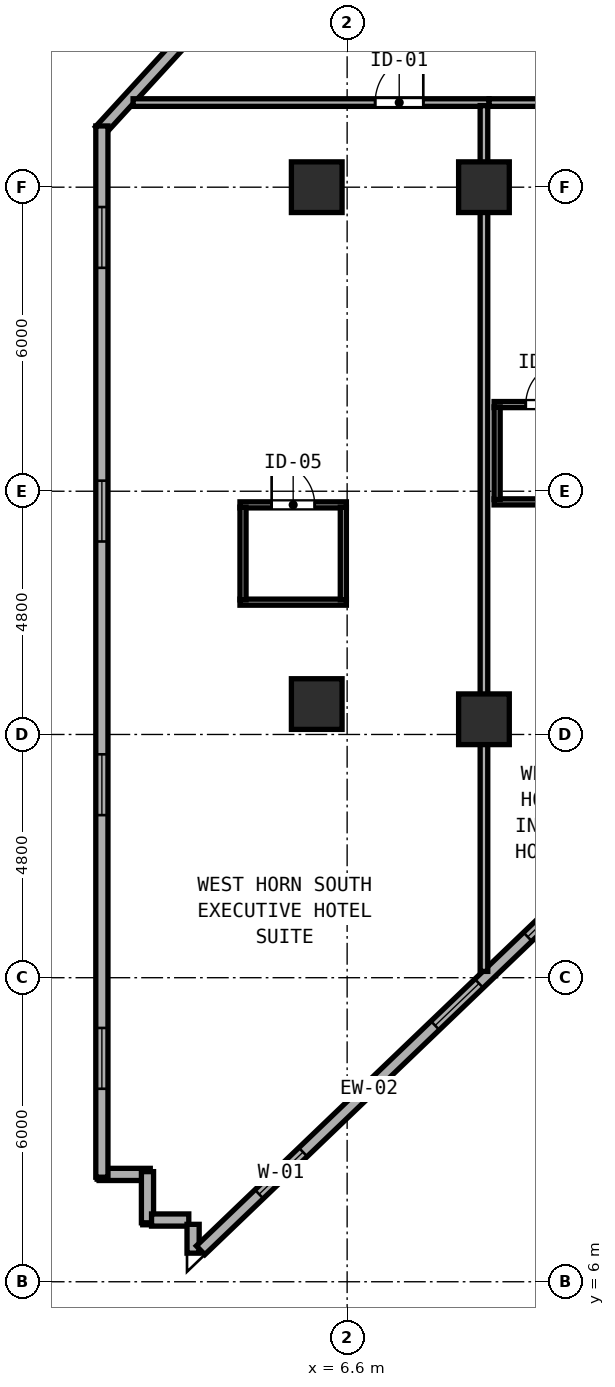
"""IFC4 building model, lengths in metres.
Left out: names, types, materials, properties, quantities, classifications, styles, units other than length and angle.
Written with IfcOpenShell. Run it as: python <this file> out.ifc"""

import sys

from ifc_helpers import new_model, si_unit, direction, frame, frame_2d, origin, origin_2d, place, context, subcontext, project, spatial, rectangle, hollow_rectangle, extrude, element, fill, save


model = new_model("IFC4")
c1 = context("Model", 3, precision=1e-05, world=origin(), true_north=direction((0.0, 1.0)))
c2 = subcontext(c1, "Body", "Model", "MODEL_VIEW")
j1 = project(units=[si_unit("LENGTHUNIT", "METRE"), si_unit("PLANEANGLEUNIT", "RADIAN")], contexts=[c1])
p1 = place(None, origin())
s1 = spatial("IfcSite", under=j1, at=p1, CompositionType="ELEMENT")
p2 = place(p1, origin())
s2 = spatial("IfcBuilding", under=s1, at=p2, CompositionType="ELEMENT")
p3 = place(p2, frame((0.0, 0.0, 55.2)))
s3 = spatial("IfcBuildingStorey", under=s2, at=p3, CompositionType="ELEMENT", Elevation=55.2)
for number, where, z_axis, x_axis in (
    (1, (6.0, 17.4, 0.0), (0.0, 0.0, 1.0), (1.0, 0.0, 0.0)),
    (2, (6.0, 27.6, 0.0), (0.0, 0.0, 1.0), (1.0, 0.0, 0.0)),
    (3, (9.3, 17.1, 0.0), (0.0, 0.0, 1.0), (1.0, 0.0, 0.0)),
    (4, (9.3, 27.6, 0.0), (0.0, 0.0, 1.0), (1.0, 0.0, 0.0)),
):
    element("IfcColumn", number, at=place(p3, frame(where, z_axis=z_axis, x_axis=x_axis)), inside=s3, PredefinedType="COLUMN", context=c2, shape_type="SweptSolid", body=[
        extrude(hollow_rectangle(XDim=1.0, YDim=1.0, WallThickness=0.038, at=origin_2d()), origin(), (0.0, 0.0, 1.0), 3.8),
    ])
for number, where, z_axis, x_axis in (
    (5, (1.705, 8.118, 0.0), (0.0, 0.0, 1.0), (1.0, 0.0, 0.0)),
    (6, (2.66, 8.173, 0.0), (0.0, 0.0, 1.0), (0.0, -1.0, 0.0)),
):
    element("IfcWall", number, at=place(p3, frame(where, z_axis=z_axis, x_axis=x_axis)), inside=s3, PredefinedType="SOLIDWALL", context=c2, shape_type="SweptSolid", body=[
        extrude(rectangle(XDim=1.01, YDim=0.24, at=frame_2d((0.505, 0.0))), origin(), (0.0, 0.0, 1.0), 3.6),
    ])
p4 = place(p3, frame((2.74, 7.218, 0.0), z_axis=(0.0, 0.0, 1.0), x_axis=(1.0, 0.0, 0.0)))
e7 = element("IfcWall", 7, at=p4, inside=s3, PredefinedType="SOLIDWALL", context=c2, shape_type="SweptSolid", body=[
    extrude(rectangle(XDim=0.735, YDim=0.24, at=frame_2d((0.368, 0.0))), origin(), (0.0, 0.0, 1.0), 3.6),
])
p5 = place(p3, frame((3.56, 7.133, 0.0), z_axis=(0.0, 0.0, 1.0), x_axis=(0.0, -1.0, 0.0)))
e8 = element("IfcWall", 8, at=p5, inside=s3, PredefinedType="SOLIDWALL", context=c2, shape_type="SweptSolid", body=[
    extrude(rectangle(XDim=0.569, YDim=0.24, at=frame_2d((0.284, 0.0))), origin(), (0.0, 0.0, 1.0), 3.6),
])
p6 = place(p3, frame((3.708, 6.621, 0.0), z_axis=(0.0, 0.0, 1.0), x_axis=(0.722047630521, 0.691843348786, 0.0)))
e9 = element("IfcWall", 9, at=p6, inside=s3, PredefinedType="SOLIDWALL", context=c2, shape_type="SweptSolid", body=[
    extrude(rectangle(XDim=11.373, YDim=0.24, at=frame_2d((5.687, 0.0))), origin(), (0.0, 0.0, 1.0), 3.6),
])
p7 = place(p6, frame((1.6, 0.0, 0.85)))
e10 = element("IfcOpeningElement", 10, at=p7, cuts=e9, PredefinedType="OPENING", context=c2, shape_type="SweptSolid", body=[
    extrude(rectangle(XDim=1.2, YDim=1.85, at=frame_2d((0.6, 0.925))), frame((0.0, 0.13, 0.0), z_axis=(0.0, -1.0, 0.0), x_axis=(1.0, 0.0, 0.0)), (0.0, 0.0, 1.0), 0.26),
])
p8 = place(p6, frame((6.41, 0.0, 0.85)))
e11 = element("IfcOpeningElement", 11, at=p8, cuts=e9, PredefinedType="OPENING", context=c2, shape_type="SweptSolid", body=[
    extrude(rectangle(XDim=1.2, YDim=1.85, at=frame_2d((0.6, 0.925))), frame((0.0, 0.13, 0.0), z_axis=(0.0, -1.0, 0.0), x_axis=(1.0, 0.0, 0.0)), (0.0, 0.0, 1.0), 0.26),
])
p9 = place(p6, frame((8.94, 0.0, 0.85)))
e12 = element("IfcOpeningElement", 12, at=p9, cuts=e9, PredefinedType="OPENING", context=c2, shape_type="SweptSolid", body=[
    extrude(rectangle(XDim=1.2, YDim=1.85, at=frame_2d((0.6, 0.925))), frame((0.0, 0.13, 0.0), z_axis=(0.0, -1.0, 0.0), x_axis=(1.0, 0.0, 0.0)), (0.0, 0.0, 1.0), 0.26),
])
p10 = place(p3, frame((3.943, 31.135, 0.0), z_axis=(0.0, 0.0, 1.0), x_axis=(-0.675751546976, -0.737129464042, 0.0)))
e13 = element("IfcWall", 13, at=p10, inside=s3, PredefinedType="SOLIDWALL", context=c2, shape_type="SweptSolid", body=[
    extrude(rectangle(XDim=3.286, YDim=0.24, at=frame_2d((1.643, 0.0))), origin(), (0.0, 0.0, 1.0), 3.6),
])
p11 = place(p3, frame((1.76, 28.808, 0.0), z_axis=(0.0, 0.0, 1.0), x_axis=(0.0, -1.0, 0.0)))
e14 = element("IfcWall", 14, at=p11, inside=s3, PredefinedType="SOLIDWALL", context=c2, shape_type="SweptSolid", body=[
    extrude(rectangle(XDim=20.745, YDim=0.24, at=frame_2d((10.373, 0.0))), origin(), (0.0, 0.0, 1.0), 3.6),
])
p12 = place(p11, frame((1.6, 0.0, 0.85)))
e15 = element("IfcOpeningElement", 15, at=p12, cuts=e14, PredefinedType="OPENING", context=c2, shape_type="SweptSolid", body=[
    extrude(rectangle(XDim=1.2, YDim=1.85, at=frame_2d((0.6, 0.925))), frame((0.0, 0.13, 0.0), z_axis=(0.0, -1.0, 0.0), x_axis=(1.0, 0.0, 0.0)), (0.0, 0.0, 1.0), 0.26),
])
p13 = place(p11, frame((7.0, 0.0, 0.85)))
e16 = element("IfcOpeningElement", 16, at=p13, cuts=e14, PredefinedType="OPENING", context=c2, shape_type="SweptSolid", body=[
    extrude(rectangle(XDim=1.2, YDim=1.85, at=frame_2d((0.6, 0.925))), frame((0.0, 0.13, 0.0), z_axis=(0.0, -1.0, 0.0), x_axis=(1.0, 0.0, 0.0)), (0.0, 0.0, 1.0), 0.26),
])
p14 = place(p11, frame((12.4, 0.0, 0.85)))
e17 = element("IfcOpeningElement", 17, at=p14, cuts=e14, PredefinedType="OPENING", context=c2, shape_type="SweptSolid", body=[
    extrude(rectangle(XDim=1.2, YDim=1.85, at=frame_2d((0.6, 0.925))), frame((0.0, 0.13, 0.0), z_axis=(0.0, -1.0, 0.0), x_axis=(1.0, 0.0, 0.0)), (0.0, 0.0, 1.0), 0.26),
])
p15 = place(p11, frame((17.8, 0.0, 0.85)))
e18 = element("IfcOpeningElement", 18, at=p15, cuts=e14, PredefinedType="OPENING", context=c2, shape_type="SweptSolid", body=[
    extrude(rectangle(XDim=1.2, YDim=1.85, at=frame_2d((0.6, 0.925))), frame((0.0, 0.13, 0.0), z_axis=(0.0, -1.0, 0.0), x_axis=(1.0, 0.0, 0.0)), (0.0, 0.0, 1.0), 0.26),
])
p16 = place(p3, frame((2.376, 29.27, 0.0), z_axis=(0.0, 0.0, 1.0), x_axis=(1.0, 0.0, 0.0)))
e19 = element("IfcWall", 19, at=p16, inside=s3, PredefinedType="PARTITIONING", context=c2, shape_type="SweptSolid", body=[
    extrude(rectangle(XDim=7.024, YDim=0.15, at=frame_2d((3.512, 0.0))), origin(), (0.0, 0.0, 1.0), 3.6),
])
p17 = place(p16, frame((5.727, 0.0, 0.0), z_axis=(0.0, 0.0, 1.0), x_axis=(-1.0, 0.0, 0.0)))
e20 = element("IfcOpeningElement", 20, at=p17, cuts=e19, PredefinedType="OPENING", context=c2, shape_type="SweptSolid", body=[
    extrude(rectangle(XDim=0.95, YDim=2.18, at=frame_2d((0.475, 1.09))), frame((0.0, 0.085, 0.0), z_axis=(0.0, -1.0, 0.0), x_axis=(1.0, 0.0, 0.0)), (0.0, 0.0, 1.0), 0.17),
])
p18 = place(p3, frame((9.3, 12.125, 0.0), z_axis=(0.0, 0.0, 1.0), x_axis=(0.0, 1.0, 0.0)))
e21 = element("IfcWall", 21, at=p18, inside=s3, PredefinedType="PARTITIONING", context=c2, shape_type="SweptSolid", body=[
    extrude(rectangle(XDim=17.085, YDim=0.15, at=frame_2d((8.543, 0.0))), origin(), (0.0, 0.0, 1.0), 3.6),
])
p19 = place(p3, frame((4.485, 21.331, 0.0), z_axis=(0.0, 0.0, 1.0), x_axis=(1.0, 0.0, 0.0)))
e22 = element("IfcWall", 22, at=p19, inside=s3, PredefinedType="PARTITIONING", context=c2, shape_type="SweptSolid", body=[
    extrude(rectangle(XDim=2.1, YDim=0.12, at=frame_2d((1.05, 0.0))), origin(), (0.0, 0.0, 1.0), 3.6),
])
p20 = place(p19, frame((1.475, 0.0, 0.0), z_axis=(0.0, 0.0, 1.0), x_axis=(-1.0, 0.0, 0.0)))
e23 = element("IfcOpeningElement", 23, at=p20, cuts=e22, PredefinedType="OPENING", context=c2, shape_type="SweptSolid", body=[
    extrude(rectangle(XDim=0.85, YDim=2.1, at=frame_2d((0.425, 1.05))), frame((0.0, 0.07, 0.0), z_axis=(0.0, -1.0, 0.0), x_axis=(1.0, 0.0, 0.0)), (0.0, 0.0, 1.0), 0.14),
])
p21 = place(p3, frame((4.485, 19.411, 0.0), z_axis=(0.0, 0.0, 1.0), x_axis=(1.0, 0.0, 0.0)))
e24 = element("IfcWall", 24, at=p21, inside=s3, PredefinedType="PARTITIONING", context=c2, shape_type="SweptSolid", body=[
    extrude(rectangle(XDim=2.1, YDim=0.12, at=frame_2d((1.05, 0.0))), origin(), (0.0, 0.0, 1.0), 3.6),
])
for number, where, z_axis, x_axis in (
    (25, (4.545, 19.456, 0.0), (0.0, 0.0, 1.0), (0.0, 1.0, 0.0)),
    (26, (6.525, 19.456, 0.0), (0.0, 0.0, 1.0), (0.0, 1.0, 0.0)),
):
    element("IfcWall", number, at=place(p3, frame(where, z_axis=z_axis, x_axis=x_axis)), inside=s3, PredefinedType="PARTITIONING", context=c2, shape_type="SweptSolid", body=[
        extrude(rectangle(XDim=1.83, YDim=0.12, at=frame_2d((0.915, 0.0))), origin(), (0.0, 0.0, 1.0), 3.6),
    ])
p22 = place(p3, frame((9.402, 29.27, 0.0), z_axis=(0.0, 0.0, 1.0), x_axis=(1.0, 0.0, 0.0)))
e27 = element("IfcWall", 27, at=p22, inside=s3, PredefinedType="PARTITIONING", context=c2, shape_type="SweptSolid", body=[
    extrude(rectangle(XDim=2.296, YDim=0.15, at=frame_2d((1.148, 0.0))), origin(), (0.0, 0.0, 1.0), 3.6),
])
p23 = place(p22, frame((1.934, 0.0, 0.0), z_axis=(0.0, 0.0, 1.0), x_axis=(-1.0, 0.0, 0.0)))
e28 = element("IfcOpeningElement", 28, at=p23, cuts=e27, PredefinedType="OPENING", context=c2, shape_type="SweptSolid", body=[
    extrude(rectangle(XDim=0.95, YDim=2.15, at=frame_2d((0.475, 1.075))), frame((0.0, 0.085, 0.0), z_axis=(0.0, -1.0, 0.0), x_axis=(1.0, 0.0, 0.0)), (0.0, 0.0, 1.0), 0.17),
])
p24 = place(p3, frame((9.5, 23.31, 0.0), z_axis=(0.0, 0.0, 1.0), x_axis=(1.0, 0.0, 0.0)))
e29 = element("IfcWall", 29, at=p24, inside=s3, PredefinedType="PARTITIONING", context=c2, shape_type="SweptSolid", body=[
    extrude(rectangle(XDim=2.1, YDim=0.12, at=frame_2d((1.05, 0.0))), origin(), (0.0, 0.0, 1.0), 3.6),
])
p25 = place(p24, frame((1.475, 0.0, 0.0), z_axis=(0.0, 0.0, 1.0), x_axis=(-1.0, 0.0, 0.0)))
e30 = element("IfcOpeningElement", 30, at=p25, cuts=e29, PredefinedType="OPENING", context=c2, shape_type="SweptSolid", body=[
    extrude(rectangle(XDim=0.85, YDim=2.1, at=frame_2d((0.425, 1.05))), frame((0.0, 0.07, 0.0), z_axis=(0.0, -1.0, 0.0), x_axis=(1.0, 0.0, 0.0)), (0.0, 0.0, 1.0), 0.14),
])
p26 = place(p3, frame((9.5, 21.39, 0.0), z_axis=(0.0, 0.0, 1.0), x_axis=(1.0, 0.0, 0.0)))
e31 = element("IfcWall", 31, at=p26, inside=s3, PredefinedType="PARTITIONING", context=c2, shape_type="SweptSolid", body=[
    extrude(rectangle(XDim=2.1, YDim=0.12, at=frame_2d((1.05, 0.0))), origin(), (0.0, 0.0, 1.0), 3.6),
])
p27 = place(p3, frame((9.56, 21.435, 0.0), z_axis=(0.0, 0.0, 1.0), x_axis=(0.0, 1.0, 0.0)))
e32 = element("IfcWall", 32, at=p27, inside=s3, PredefinedType="PARTITIONING", context=c2, shape_type="SweptSolid", body=[
    extrude(rectangle(XDim=1.83, YDim=0.12, at=frame_2d((0.915, 0.0))), origin(), (0.0, 0.0, 1.0), 3.6),
])
p28 = place(p7, origin())
e33 = element("IfcWindow", 33, at=p28, inside=s3, PartitioningType="SINGLE_PANEL", PredefinedType="WINDOW", context=c2, shape_type="SweptSolid", body=[
    extrude(rectangle(XDim=1.2, YDim=1.85, at=frame_2d((0.6, 0.925))), frame((0.0, 0.03, 0.0), z_axis=(0.0, -1.0, 0.0), x_axis=(1.0, 0.0, 0.0)), (0.0, 0.0, 1.0), 0.06),
])
fill(e10, e33)
p29 = place(p8, origin())
e34 = element("IfcWindow", 34, at=p29, inside=s3, PartitioningType="SINGLE_PANEL", PredefinedType="WINDOW", context=c2, shape_type="SweptSolid", body=[
    extrude(rectangle(XDim=1.2, YDim=1.85, at=frame_2d((0.6, 0.925))), frame((0.0, 0.03, 0.0), z_axis=(0.0, -1.0, 0.0), x_axis=(1.0, 0.0, 0.0)), (0.0, 0.0, 1.0), 0.06),
])
fill(e11, e34)
p30 = place(p12, origin())
e35 = element("IfcWindow", 35, at=p30, inside=s3, PartitioningType="SINGLE_PANEL", PredefinedType="WINDOW", context=c2, shape_type="SweptSolid", body=[
    extrude(rectangle(XDim=1.2, YDim=1.85, at=frame_2d((0.6, 0.925))), frame((0.0, 0.03, 0.0), z_axis=(0.0, -1.0, 0.0), x_axis=(1.0, 0.0, 0.0)), (0.0, 0.0, 1.0), 0.06),
])
fill(e15, e35)
p31 = place(p13, origin())
e36 = element("IfcWindow", 36, at=p31, inside=s3, PartitioningType="SINGLE_PANEL", PredefinedType="WINDOW", context=c2, shape_type="SweptSolid", body=[
    extrude(rectangle(XDim=1.2, YDim=1.85, at=frame_2d((0.6, 0.925))), frame((0.0, 0.03, 0.0), z_axis=(0.0, -1.0, 0.0), x_axis=(1.0, 0.0, 0.0)), (0.0, 0.0, 1.0), 0.06),
])
fill(e16, e36)
p32 = place(p14, origin())
e37 = element("IfcWindow", 37, at=p32, inside=s3, PartitioningType="SINGLE_PANEL", PredefinedType="WINDOW", context=c2, shape_type="SweptSolid", body=[
    extrude(rectangle(XDim=1.2, YDim=1.85, at=frame_2d((0.6, 0.925))), frame((0.0, 0.03, 0.0), z_axis=(0.0, -1.0, 0.0), x_axis=(1.0, 0.0, 0.0)), (0.0, 0.0, 1.0), 0.06),
])
fill(e17, e37)
p33 = place(p15, origin())
e38 = element("IfcWindow", 38, at=p33, inside=s3, PartitioningType="SINGLE_PANEL", PredefinedType="WINDOW", context=c2, shape_type="SweptSolid", body=[
    extrude(rectangle(XDim=1.2, YDim=1.85, at=frame_2d((0.6, 0.925))), frame((0.0, 0.03, 0.0), z_axis=(0.0, -1.0, 0.0), x_axis=(1.0, 0.0, 0.0)), (0.0, 0.0, 1.0), 0.06),
])
fill(e18, e38)
p34 = place(p17, origin())
e39 = element("IfcDoor", 39, at=p34, inside=s3, OperationType="SINGLE_SWING_LEFT", PredefinedType="DOOR", context=c2, shape_type="SweptSolid", body=[
    extrude(rectangle(XDim=0.95, YDim=2.18, at=frame_2d((0.475, 1.09))), frame((0.0, 0.025, 0.0), z_axis=(0.0, -1.0, 0.0), x_axis=(1.0, 0.0, 0.0)), (0.0, 0.0, 1.0), 0.05),
])
fill(e20, e39)
p35 = place(p20, origin())
e40 = element("IfcDoor", 40, at=p35, inside=s3, OperationType="SINGLE_SWING_RIGHT", PredefinedType="DOOR", context=c2, shape_type="SweptSolid", body=[
    extrude(rectangle(XDim=0.85, YDim=2.1, at=frame_2d((0.425, 1.05))), frame((0.0, 0.025, 0.0), z_axis=(0.0, -1.0, 0.0), x_axis=(1.0, 0.0, 0.0)), (0.0, 0.0, 1.0), 0.05),
])
fill(e23, e40)
p36 = place(p25, origin())
e41 = element("IfcDoor", 41, at=p36, inside=s3, OperationType="SINGLE_SWING_LEFT", PredefinedType="DOOR", context=c2, shape_type="SweptSolid", body=[
    extrude(rectangle(XDim=0.85, YDim=2.1, at=frame_2d((0.425, 1.05))), frame((0.0, 0.025, 0.0), z_axis=(0.0, -1.0, 0.0), x_axis=(1.0, 0.0, 0.0)), (0.0, 0.0, 1.0), 0.05),
])
fill(e30, e41)
p37 = place(p9, origin())
e42 = element("IfcWindow", 42, at=p37, inside=s3, PartitioningType="SINGLE_PANEL", PredefinedType="WINDOW", context=c2, shape_type="SweptSolid", body=[
    extrude(rectangle(XDim=1.2, YDim=1.85, at=frame_2d((0.6, 0.925))), frame((0.0, 0.03, 0.0), z_axis=(0.0, -1.0, 0.0), x_axis=(1.0, 0.0, 0.0)), (0.0, 0.0, 1.0), 0.06),
])
fill(e12, e42)
save(model, sys.argv[1])
